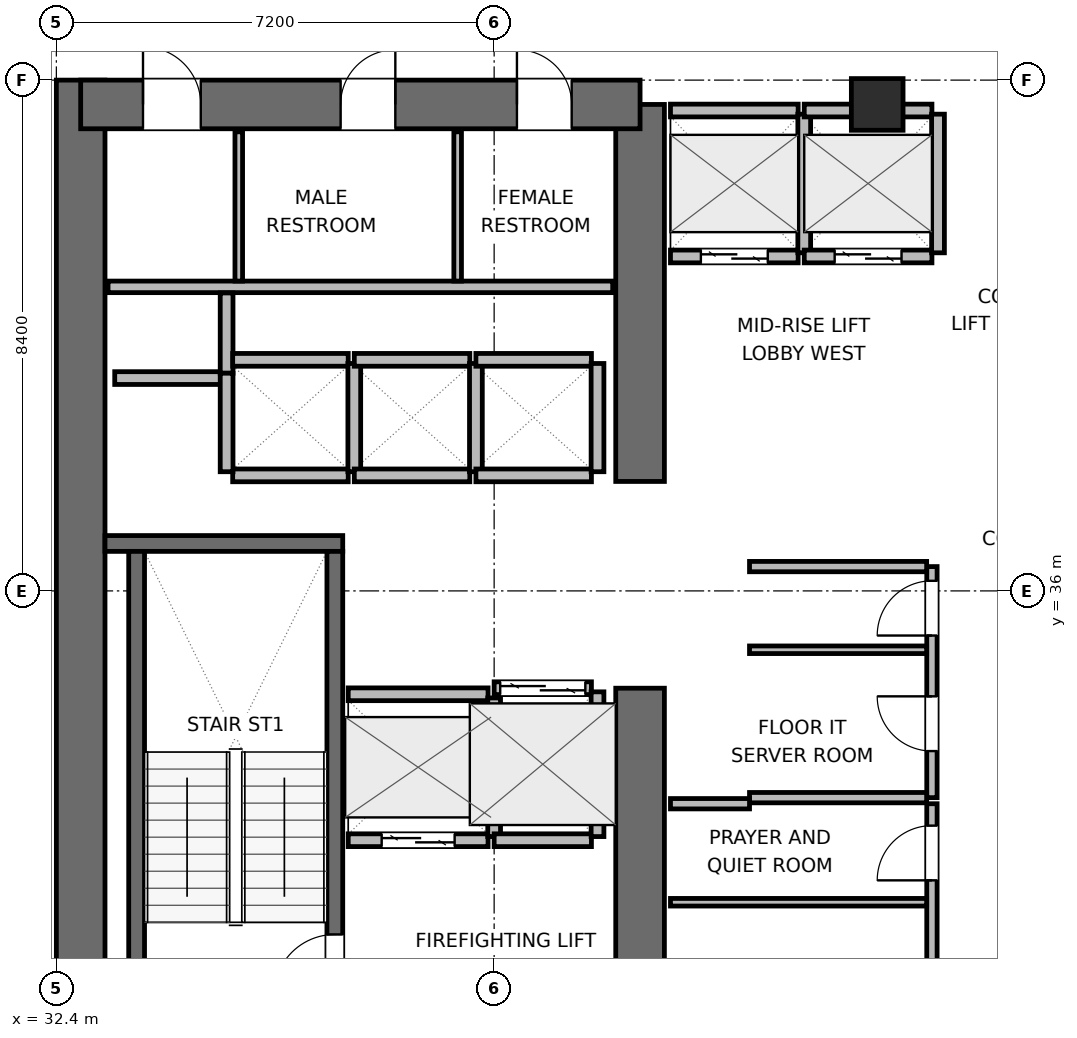
"""IFC4 building model, lengths in metres.
Left out: names, types, materials, properties, quantities, classifications, styles, units other than length and angle.
Written with IfcOpenShell. Run it as: python <this file> out.ifc"""

import sys

from ifc_helpers import new_model, si_unit, direction, frame, frame_2d, origin, origin_2d, place, context, subcontext, project, spatial, rectangle, extrude, element, fill, save


model = new_model("IFC4")
c1 = context("Model", 3, precision=1e-05, world=origin(), true_north=direction((0.0, 1.0)))
c2 = subcontext(c1, "Body", "Model", "MODEL_VIEW")
j1 = project(units=[si_unit("LENGTHUNIT", "METRE"), si_unit("PLANEANGLEUNIT", "RADIAN")], contexts=[c1])
p1 = place(None, origin())
s1 = spatial("IfcSite", under=j1, at=p1, CompositionType="ELEMENT")
p2 = place(p1, origin())
s2 = spatial("IfcBuilding", under=s1, at=p2, CompositionType="ELEMENT")
p3 = place(p2, frame((0.0, 0.0, 177.9)))
s3 = spatial("IfcBuildingStorey", under=s2, at=p3, CompositionType="ELEMENT", Elevation=177.9)
p4 = place(p3, frame((32.8, 27.6, 0.0), z_axis=(0.0, 0.0, 1.0), x_axis=(0.0, 1.0, 0.0)))
e1 = element("IfcWall", 1, at=p4, inside=s3, PredefinedType="SHEAR", context=c2, shape_type="SweptSolid", body=[
    extrude(rectangle(XDim=16.8, YDim=0.8, at=frame_2d((8.4, 0.0))), origin(), (0.0, 0.0, 1.0), 3.9),
])
p5 = place(p3, frame((42.0, 28.0, 0.0), z_axis=(0.0, 0.0, 1.0), x_axis=(0.0, 1.0, 0.0)))
e2 = element("IfcWall", 2, at=p5, inside=s3, PredefinedType="SHEAR", context=c2, shape_type="SweptSolid", body=[
    extrude(rectangle(XDim=6.4, YDim=0.8, at=frame_2d((3.2, 0.0))), origin(), (0.0, 0.0, 1.0), 3.9),
])
p6 = place(p3, frame((42.0, 37.8, 0.0), z_axis=(0.0, 0.0, 1.0), x_axis=(0.0, 1.0, 0.0)))
e3 = element("IfcWall", 3, at=p6, inside=s3, PredefinedType="SHEAR", context=c2, shape_type="SweptSolid", body=[
    extrude(rectangle(XDim=6.2, YDim=0.8, at=frame_2d((3.1, 0.0))), origin(), (0.0, 0.0, 1.0), 3.9),
])
p7 = place(p3, frame((32.8, 44.0, 0.0), z_axis=(0.0, 0.0, 1.0), x_axis=(1.0, 0.0, 0.0)))
e4 = element("IfcWall", 4, at=p7, inside=s3, PredefinedType="SHEAR", context=c2, shape_type="SweptSolid", body=[
    extrude(rectangle(XDim=9.2, YDim=0.8, at=frame_2d((4.6, 0.0))), origin(), (0.0, 0.0, 1.0), 3.9),
])
p8 = place(p7, frame((1.025, 0.0, 0.0)))
e5 = element("IfcOpeningElement", 5, at=p8, cuts=e4, PredefinedType="OPENING", context=c2, shape_type="SweptSolid", body=[
    extrude(rectangle(XDim=0.95, YDim=2.04, at=frame_2d((0.475, 1.02))), frame((0.0, 0.41, 0.0), z_axis=(0.0, -1.0, 0.0), x_axis=(1.0, 0.0, 0.0)), (0.0, 0.0, 1.0), 0.82),
])
p9 = place(p7, frame((4.275, 0.0, 0.0)))
e6 = element("IfcOpeningElement", 6, at=p9, cuts=e4, PredefinedType="OPENING", context=c2, shape_type="SweptSolid", body=[
    extrude(rectangle(XDim=0.9, YDim=2.02, at=frame_2d((0.45, 1.01))), frame((0.0, 0.41, 0.0), z_axis=(0.0, -1.0, 0.0), x_axis=(1.0, 0.0, 0.0)), (0.0, 0.0, 1.0), 0.82),
])
p10 = place(p7, frame((7.175, 0.0, 0.0)))
e7 = element("IfcOpeningElement", 7, at=p10, cuts=e4, PredefinedType="OPENING", context=c2, shape_type="SweptSolid", body=[
    extrude(rectangle(XDim=0.9, YDim=2.02, at=frame_2d((0.45, 1.01))), frame((0.0, 0.41, 0.0), z_axis=(0.0, -1.0, 0.0), x_axis=(1.0, 0.0, 0.0)), (0.0, 0.0, 1.0), 0.82),
])
p11 = place(p3, frame((33.2, 36.78, 0.0), z_axis=(0.0, 0.0, 1.0), x_axis=(1.0, 0.0, 0.0)))
e8 = element("IfcWall", 8, at=p11, inside=s3, PredefinedType="SHEAR", context=c2, shape_type="SweptSolid", body=[
    extrude(rectangle(XDim=3.91, YDim=0.26, at=frame_2d((1.955, 0.0))), origin(), (0.0, 0.0, 1.0), 3.9),
])
p12 = place(p3, frame((33.72, 29.05, 0.0), z_axis=(0.0, 0.0, 1.0), x_axis=(0.0, 1.0, 0.0)))
e9 = element("IfcWall", 9, at=p12, inside=s3, PredefinedType="SHEAR", context=c2, shape_type="SweptSolid", body=[
    extrude(rectangle(XDim=7.6, YDim=0.26, at=frame_2d((3.8, 0.0))), origin(), (0.0, 0.0, 1.0), 3.9),
])
p13 = place(p3, frame((36.98, 29.05, 0.0), z_axis=(0.0, 0.0, 1.0), x_axis=(0.0, 1.0, 0.0)))
e10 = element("IfcWall", 10, at=p13, inside=s3, PredefinedType="SHEAR", context=c2, shape_type="SweptSolid", body=[
    extrude(rectangle(XDim=7.6, YDim=0.26, at=frame_2d((3.8, 0.0))), origin(), (0.0, 0.0, 1.0), 3.9),
])
p14 = place(p13, frame((0.3, 0.0, 0.0)))
e11 = element("IfcOpeningElement", 11, at=p14, cuts=e10, PredefinedType="OPENING", context=c2, shape_type="SweptSolid", body=[
    extrude(rectangle(XDim=1.0, YDim=2.04, at=frame_2d((0.5, 1.02))), frame((0.0, 0.14, 0.0), z_axis=(0.0, -1.0, 0.0), x_axis=(1.0, 0.0, 0.0)), (0.0, 0.0, 1.0), 0.28),
])
p15 = place(p3, frame((45.9, 44.0, 0.0), z_axis=(0.0, 0.0, 1.0), x_axis=(1.0, 0.0, 0.0)))
e12 = element("IfcColumn", 12, at=p15, inside=s3, PredefinedType="COLUMN", context=c2, shape_type="SweptSolid", body=[
    extrude(rectangle(XDim=0.85, YDim=0.85, at=origin_2d()), origin(), (0.0, 0.0, 1.0), 3.9),
])
p16 = place(p3, frame((33.25, 41.0, 0.0), z_axis=(0.0, 0.0, 1.0), x_axis=(1.0, 0.0, 0.0)))
e13 = element("IfcWall", 13, at=p16, inside=s3, PredefinedType="PLUMBINGWALL", context=c2, shape_type="SweptSolid", body=[
    extrude(rectangle(XDim=8.3, YDim=0.19, at=frame_2d((4.15, 0.0))), origin(), (0.0, 0.0, 1.0), 3.68),
])
for number, where, z_axis, x_axis in (
    (14, (35.4, 41.095, 0.0), (0.0, 0.0, 1.0), (0.0, 1.0, 0.0)),
    (15, (39.0, 41.095, 0.0), (0.0, 0.0, 1.0), (0.0, 1.0, 0.0)),
):
    element("IfcWall", number, at=place(p3, frame(where, z_axis=z_axis, x_axis=x_axis)), inside=s3, PredefinedType="PARTITIONING", context=c2, shape_type="SweptSolid", body=[
        extrude(rectangle(XDim=2.455, YDim=0.125, at=frame_2d((1.228, 0.0))), origin(), (0.0, 0.0, 1.0), 3.68),
    ])
p17 = place(p3, frame((33.36, 39.5, 0.0), z_axis=(0.0, 0.0, 1.0), x_axis=(1.0, 0.0, 0.0)))
e16 = element("IfcWall", 16, at=p17, inside=s3, PredefinedType="PARTITIONING", context=c2, shape_type="SweptSolid", body=[
    extrude(rectangle(XDim=1.86, YDim=0.21, at=frame_2d((0.93, 0.0))), origin(), (0.0, 0.0, 1.0), 3.68),
])
p18 = place(p3, frame((35.2, 39.58, 0.0), z_axis=(0.0, 0.0, 1.0), x_axis=(0.0, 1.0, 0.0)))
e17 = element("IfcWall", 17, at=p18, inside=s3, PredefinedType="PARTITIONING", context=c2, shape_type="SweptSolid", body=[
    extrude(rectangle(XDim=1.32, YDim=0.21, at=frame_2d((0.66, 0.0))), origin(), (0.0, 0.0, 1.0), 3.68),
])
p19 = place(p3, frame((37.2, 31.9, 0.0), z_axis=(0.0, 0.0, 1.0), x_axis=(1.0, 0.0, 0.0)))
e18 = element("IfcWall", 18, at=p19, inside=s3, PredefinedType="PARTITIONING", context=c2, shape_type="SweptSolid", body=[
    extrude(rectangle(XDim=2.3, YDim=0.21, at=frame_2d((1.15, 0.0))), origin(), (0.0, 0.0, 1.0), 3.68),
])
p20 = place(p19, frame((0.55, 0.0, 0.0)))
e19 = element("IfcOpeningElement", 19, at=p20, cuts=e18, PredefinedType="OPENING", context=c2, shape_type="SweptSolid", body=[
    extrude(rectangle(XDim=1.2, YDim=2.04, at=frame_2d((0.6, 1.02))), frame((0.0, 0.115, 0.0), z_axis=(0.0, -1.0, 0.0), x_axis=(1.0, 0.0, 0.0)), (0.0, 0.0, 1.0), 0.23),
])
p21 = place(p3, frame((37.2, 34.3, 0.0), z_axis=(0.0, 0.0, 1.0), x_axis=(1.0, 0.0, 0.0)))
e20 = element("IfcWall", 20, at=p21, inside=s3, PredefinedType="PARTITIONING", context=c2, shape_type="SweptSolid", body=[
    extrude(rectangle(XDim=2.3, YDim=0.21, at=frame_2d((1.15, 0.0))), origin(), (0.0, 0.0, 1.0), 3.68),
])
p22 = place(p3, frame((39.6, 31.96, 0.0), z_axis=(0.0, 0.0, 1.0), x_axis=(0.0, 1.0, 0.0)))
e21 = element("IfcWall", 21, at=p22, inside=s3, PredefinedType="PARTITIONING", context=c2, shape_type="SweptSolid", body=[
    extrude(rectangle(XDim=2.28, YDim=0.21, at=frame_2d((1.14, 0.0))), origin(), (0.0, 0.0, 1.0), 3.68),
])
p23 = place(p3, frame((39.6, 34.4, 0.0), z_axis=(0.0, 0.0, 1.0), x_axis=(1.0, 0.0, 0.0)))
e22 = element("IfcWall", 22, at=p23, inside=s3, PredefinedType="PARTITIONING", context=c2, shape_type="SweptSolid", body=[
    extrude(rectangle(XDim=1.6, YDim=0.21, at=frame_2d((0.8, 0.0))), origin(), (0.0, 0.0, 1.0), 3.68),
])
p24 = place(p23, frame((0.1, 0.0, 0.0)))
e23 = element("IfcOpeningElement", 23, at=p24, cuts=e22, PredefinedType="OPENING", context=c2, shape_type="SweptSolid", body=[
    extrude(rectangle(XDim=1.4, YDim=2.06, at=frame_2d((0.7, 1.03))), frame((0.0, 0.115, 0.0), z_axis=(0.0, -1.0, 0.0), x_axis=(1.0, 0.0, 0.0)), (0.0, 0.0, 1.0), 0.23),
])
p25 = place(p3, frame((39.6, 31.9, 0.0), z_axis=(0.0, 0.0, 1.0), x_axis=(1.0, 0.0, 0.0)))
e24 = element("IfcWall", 24, at=p25, inside=s3, PredefinedType="PARTITIONING", context=c2, shape_type="SweptSolid", body=[
    extrude(rectangle(XDim=1.6, YDim=0.21, at=frame_2d((0.8, 0.0))), origin(), (0.0, 0.0, 1.0), 3.68),
])
p26 = place(p3, frame((41.3, 31.96, 0.0), z_axis=(0.0, 0.0, 1.0), x_axis=(0.0, 1.0, 0.0)))
e25 = element("IfcWall", 25, at=p26, inside=s3, PredefinedType="PARTITIONING", context=c2, shape_type="SweptSolid", body=[
    extrude(rectangle(XDim=2.38, YDim=0.21, at=frame_2d((1.19, 0.0))), origin(), (0.0, 0.0, 1.0), 3.68),
])
p27 = place(p3, frame((42.5, 41.5, 0.0), z_axis=(0.0, 0.0, 1.0), x_axis=(1.0, 0.0, 0.0)))
e26 = element("IfcWall", 26, at=p27, inside=s3, PredefinedType="PARTITIONING", context=c2, shape_type="SweptSolid", body=[
    extrude(rectangle(XDim=2.1, YDim=0.21, at=frame_2d((1.05, 0.0))), origin(), (0.0, 0.0, 1.0), 3.68),
])
p28 = place(p27, frame((0.5, 0.0, 0.0)))
e27 = element("IfcOpeningElement", 27, at=p28, cuts=e26, PredefinedType="OPENING", context=c2, shape_type="SweptSolid", body=[
    extrude(rectangle(XDim=1.1, YDim=2.04, at=frame_2d((0.55, 1.02))), frame((0.0, 0.115, 0.0), z_axis=(0.0, -1.0, 0.0), x_axis=(1.0, 0.0, 0.0)), (0.0, 0.0, 1.0), 0.23),
])
p29 = place(p3, frame((42.5, 43.9, 0.0), z_axis=(0.0, 0.0, 1.0), x_axis=(1.0, 0.0, 0.0)))
e28 = element("IfcWall", 28, at=p29, inside=s3, PredefinedType="PARTITIONING", context=c2, shape_type="SweptSolid", body=[
    extrude(rectangle(XDim=2.1, YDim=0.21, at=frame_2d((1.05, 0.0))), origin(), (0.0, 0.0, 1.0), 2.765),
])
p30 = place(p3, frame((44.7, 41.56, 0.0), z_axis=(0.0, 0.0, 1.0), x_axis=(0.0, 1.0, 0.0)))
e29 = element("IfcWall", 29, at=p30, inside=s3, PredefinedType="PARTITIONING", context=c2, shape_type="SweptSolid", body=[
    extrude(rectangle(XDim=2.28, YDim=0.21, at=frame_2d((1.14, 0.0))), origin(), (0.0, 0.0, 1.0), 3.68),
])
p31 = place(p3, frame((44.7, 41.5, 0.0), z_axis=(0.0, 0.0, 1.0), x_axis=(1.0, 0.0, 0.0)))
e30 = element("IfcWall", 30, at=p31, inside=s3, PredefinedType="PARTITIONING", context=c2, shape_type="SweptSolid", body=[
    extrude(rectangle(XDim=2.1, YDim=0.21, at=frame_2d((1.05, 0.0))), origin(), (0.0, 0.0, 1.0), 3.68),
])
p32 = place(p31, frame((0.5, 0.0, 0.0)))
e31 = element("IfcOpeningElement", 31, at=p32, cuts=e30, PredefinedType="OPENING", context=c2, shape_type="SweptSolid", body=[
    extrude(rectangle(XDim=1.1, YDim=2.04, at=frame_2d((0.55, 1.02))), frame((0.0, 0.115, 0.0), z_axis=(0.0, -1.0, 0.0), x_axis=(1.0, 0.0, 0.0)), (0.0, 0.0, 1.0), 0.23),
])
p33 = place(p3, frame((44.7, 43.9, 0.0), z_axis=(0.0, 0.0, 1.0), x_axis=(1.0, 0.0, 0.0)))
e32 = element("IfcWall", 32, at=p33, inside=s3, PredefinedType="PARTITIONING", context=c2, shape_type="SweptSolid", body=[
    extrude(rectangle(XDim=2.1, YDim=0.21, at=frame_2d((1.05, 0.0))), origin(), (0.0, 0.0, 1.0), 2.765),
])
p34 = place(p3, frame((46.9, 41.56, 0.0), z_axis=(0.0, 0.0, 1.0), x_axis=(0.0, 1.0, 0.0)))
e33 = element("IfcWall", 33, at=p34, inside=s3, PredefinedType="PARTITIONING", context=c2, shape_type="SweptSolid", body=[
    extrude(rectangle(XDim=2.28, YDim=0.21, at=frame_2d((1.14, 0.0))), origin(), (0.0, 0.0, 1.0), 3.68),
])
for number, where, z_axis, x_axis in (
    (34, (35.3, 37.9, 0.0), (0.0, 0.0, 1.0), (1.0, 0.0, 0.0)),
    (35, (35.3, 39.8, 0.0), (0.0, 0.0, 1.0), (1.0, 0.0, 0.0)),
):
    element("IfcWall", number, at=place(p3, frame(where, z_axis=z_axis, x_axis=x_axis)), inside=s3, PredefinedType="PARTITIONING", context=c2, shape_type="SweptSolid", body=[
        extrude(rectangle(XDim=1.9, YDim=0.21, at=frame_2d((0.95, 0.0))), origin(), (0.0, 0.0, 1.0), 3.68),
    ])
p35 = place(p3, frame((35.2, 37.96, 0.0), z_axis=(0.0, 0.0, 1.0), x_axis=(0.0, 1.0, 0.0)))
e36 = element("IfcWall", 36, at=p35, inside=s3, PredefinedType="PARTITIONING", context=c2, shape_type="SweptSolid", body=[
    extrude(rectangle(XDim=1.62, YDim=0.21, at=frame_2d((0.81, 0.0))), origin(), (0.0, 0.0, 1.0), 3.68),
])
p36 = place(p3, frame((37.3, 37.96, 0.0), z_axis=(0.0, 0.0, 1.0), x_axis=(0.0, 1.0, 0.0)))
e37 = element("IfcWall", 37, at=p36, inside=s3, PredefinedType="PARTITIONING", context=c2, shape_type="SweptSolid", body=[
    extrude(rectangle(XDim=1.78, YDim=0.21, at=frame_2d((0.89, 0.0))), origin(), (0.0, 0.0, 1.0), 3.68),
])
for number, where, z_axis, x_axis in (
    (38, (37.3, 37.9, 0.0), (0.0, 0.0, 1.0), (1.0, 0.0, 0.0)),
    (39, (37.3, 39.8, 0.0), (0.0, 0.0, 1.0), (1.0, 0.0, 0.0)),
):
    element("IfcWall", number, at=place(p3, frame(where, z_axis=z_axis, x_axis=x_axis)), inside=s3, PredefinedType="PARTITIONING", context=c2, shape_type="SweptSolid", body=[
        extrude(rectangle(XDim=1.9, YDim=0.21, at=frame_2d((0.95, 0.0))), origin(), (0.0, 0.0, 1.0), 3.68),
    ])
p37 = place(p3, frame((39.3, 37.96, 0.0), z_axis=(0.0, 0.0, 1.0), x_axis=(0.0, 1.0, 0.0)))
e40 = element("IfcWall", 40, at=p37, inside=s3, PredefinedType="PARTITIONING", context=c2, shape_type="SweptSolid", body=[
    extrude(rectangle(XDim=1.78, YDim=0.21, at=frame_2d((0.89, 0.0))), origin(), (0.0, 0.0, 1.0), 3.68),
])
for number, where, z_axis, x_axis in (
    (41, (39.3, 37.9, 0.0), (0.0, 0.0, 1.0), (1.0, 0.0, 0.0)),
    (42, (39.3, 39.8, 0.0), (0.0, 0.0, 1.0), (1.0, 0.0, 0.0)),
):
    element("IfcWall", number, at=place(p3, frame(where, z_axis=z_axis, x_axis=x_axis)), inside=s3, PredefinedType="PARTITIONING", context=c2, shape_type="SweptSolid", body=[
        extrude(rectangle(XDim=1.9, YDim=0.21, at=frame_2d((0.95, 0.0))), origin(), (0.0, 0.0, 1.0), 3.68),
    ])
p38 = place(p3, frame((41.3, 37.96, 0.0), z_axis=(0.0, 0.0, 1.0), x_axis=(0.0, 1.0, 0.0)))
e43 = element("IfcWall", 43, at=p38, inside=s3, PredefinedType="PARTITIONING", context=c2, shape_type="SweptSolid", body=[
    extrude(rectangle(XDim=1.78, YDim=0.21, at=frame_2d((0.89, 0.0))), origin(), (0.0, 0.0, 1.0), 3.68),
])
p39 = place(p3, frame((46.8, 32.6, 0.0), z_axis=(0.0, 0.0, 1.0), x_axis=(0.0, 1.0, 0.0)))
e44 = element("IfcWall", 44, at=p39, inside=s3, PredefinedType="PARTITIONING", context=c2, shape_type="SweptSolid", body=[
    extrude(rectangle(XDim=3.8, YDim=0.17, at=frame_2d((1.9, 0.0))), origin(), (0.0, 0.0, 1.0), 3.68),
])
p40 = place(p39, frame((0.766, 0.0, 0.0)))
e45 = element("IfcOpeningElement", 45, at=p40, cuts=e44, PredefinedType="OPENING", context=c2, shape_type="SweptSolid", body=[
    extrude(rectangle(XDim=0.9, YDim=2.02, at=frame_2d((0.45, 1.01))), frame((0.0, 0.095, 0.0), z_axis=(0.0, -1.0, 0.0), x_axis=(1.0, 0.0, 0.0)), (0.0, 0.0, 1.0), 0.19),
])
p41 = place(p39, frame((2.666, 0.0, 0.0)))
e46 = element("IfcOpeningElement", 46, at=p41, cuts=e44, PredefinedType="OPENING", context=c2, shape_type="SweptSolid", body=[
    extrude(rectangle(XDim=0.9, YDim=2.02, at=frame_2d((0.45, 1.01))), frame((0.0, 0.095, 0.0), z_axis=(0.0, -1.0, 0.0), x_axis=(1.0, 0.0, 0.0)), (0.0, 0.0, 1.0), 0.19),
])
for number, where, z_axis, x_axis in (
    (47, (43.8, 32.6, 0.0), (0.0, 0.0, 1.0), (1.0, 0.0, 0.0)),
    (48, (43.8, 36.4, 0.0), (0.0, 0.0, 1.0), (1.0, 0.0, 0.0)),
):
    element("IfcWall", number, at=place(p3, frame(where, z_axis=z_axis, x_axis=x_axis)), inside=s3, PredefinedType="PARTITIONING", context=c2, shape_type="SweptSolid", body=[
        extrude(rectangle(XDim=2.913, YDim=0.17, at=frame_2d((1.457, 0.0))), origin(), (0.0, 0.0, 1.0), 3.68),
    ])
p42 = place(p3, frame((43.8, 35.032, 0.0), z_axis=(0.0, 0.0, 1.0), x_axis=(1.0, 0.0, 0.0)))
e49 = element("IfcWall", 49, at=p42, inside=s3, PredefinedType="PARTITIONING", context=c2, shape_type="SweptSolid", body=[
    extrude(rectangle(XDim=2.913, YDim=0.125, at=frame_2d((1.457, 0.0))), origin(), (0.0, 0.0, 1.0), 3.68),
])
p43 = place(p3, frame((46.8, 28.0, 0.0), z_axis=(0.0, 0.0, 1.0), x_axis=(0.0, 1.0, 0.0)))
e50 = element("IfcWall", 50, at=p43, inside=s3, PredefinedType="PARTITIONING", context=c2, shape_type="SweptSolid", body=[
    extrude(rectangle(XDim=4.5, YDim=0.17, at=frame_2d((2.25, 0.0))), origin(), (0.0, 0.0, 1.0), 3.68),
])
p44 = place(p43, frame((0.99, 0.0, 0.0)))
e51 = element("IfcOpeningElement", 51, at=p44, cuts=e50, PredefinedType="OPENING", context=c2, shape_type="SweptSolid", body=[
    extrude(rectangle(XDim=0.9, YDim=2.02, at=frame_2d((0.45, 1.01))), frame((0.0, 0.095, 0.0), z_axis=(0.0, -1.0, 0.0), x_axis=(1.0, 0.0, 0.0)), (0.0, 0.0, 1.0), 0.19),
])
p45 = place(p43, frame((3.24, 0.0, 0.0)))
e52 = element("IfcOpeningElement", 52, at=p45, cuts=e50, PredefinedType="OPENING", context=c2, shape_type="SweptSolid", body=[
    extrude(rectangle(XDim=0.9, YDim=2.02, at=frame_2d((0.45, 1.01))), frame((0.0, 0.095, 0.0), z_axis=(0.0, -1.0, 0.0), x_axis=(1.0, 0.0, 0.0)), (0.0, 0.0, 1.0), 0.19),
])
p46 = place(p3, frame((42.5, 32.5, 0.0), z_axis=(0.0, 0.0, 1.0), x_axis=(1.0, 0.0, 0.0)))
e53 = element("IfcWall", 53, at=p46, inside=s3, PredefinedType="PARTITIONING", context=c2, shape_type="SweptSolid", body=[
    extrude(rectangle(XDim=1.3, YDim=0.17, at=frame_2d((0.65, 0.0))), origin(), (0.0, 0.0, 1.0), 3.68),
])
p47 = place(p3, frame((42.5, 30.88, 0.0), z_axis=(0.0, 0.0, 1.0), x_axis=(1.0, 0.0, 0.0)))
e54 = element("IfcWall", 54, at=p47, inside=s3, PredefinedType="PARTITIONING", context=c2, shape_type="SweptSolid", body=[
    extrude(rectangle(XDim=4.213, YDim=0.125, at=frame_2d((2.106, 0.0))), origin(), (0.0, 0.0, 1.0), 3.68),
])
p48 = place(p14, origin())
e55 = element("IfcDoor", 55, at=p48, inside=s3, OperationType="SINGLE_SWING_LEFT", PredefinedType="DOOR", context=c2, shape_type="SweptSolid", body=[
    extrude(rectangle(XDim=1.0, YDim=2.04, at=frame_2d((0.5, 1.02))), frame((0.0, 0.025, 0.0), z_axis=(0.0, -1.0, 0.0), x_axis=(1.0, 0.0, 0.0)), (0.0, 0.0, 1.0), 0.05),
])
fill(e11, e55)
p49 = place(p20, origin())
e56 = element("IfcDoor", 56, at=p49, inside=s3, OperationType="DOUBLE_DOOR_SLIDING", PredefinedType="DOOR", context=c2, shape_type="SweptSolid", body=[
    extrude(rectangle(XDim=1.2, YDim=2.04, at=frame_2d((0.6, 1.02))), frame((0.0, 0.025, 0.0), z_axis=(0.0, -1.0, 0.0), x_axis=(1.0, 0.0, 0.0)), (0.0, 0.0, 1.0), 0.05),
])
fill(e19, e56)
p50 = place(p24, origin())
e57 = element("IfcDoor", 57, at=p50, inside=s3, OperationType="DOUBLE_DOOR_SLIDING", PredefinedType="DOOR", context=c2, shape_type="SweptSolid", body=[
    extrude(rectangle(XDim=1.4, YDim=2.06, at=frame_2d((0.7, 1.03))), frame((0.0, 0.025, 0.0), z_axis=(0.0, -1.0, 0.0), x_axis=(1.0, 0.0, 0.0)), (0.0, 0.0, 1.0), 0.05),
])
fill(e23, e57)
p51 = place(p28, origin())
e58 = element("IfcDoor", 58, at=p51, inside=s3, OperationType="DOUBLE_DOOR_SLIDING", PredefinedType="DOOR", context=c2, shape_type="SweptSolid", body=[
    extrude(rectangle(XDim=1.1, YDim=2.04, at=frame_2d((0.55, 1.02))), frame((0.0, 0.025, 0.0), z_axis=(0.0, -1.0, 0.0), x_axis=(1.0, 0.0, 0.0)), (0.0, 0.0, 1.0), 0.05),
])
fill(e27, e58)
p52 = place(p32, origin())
e59 = element("IfcDoor", 59, at=p52, inside=s3, OperationType="DOUBLE_DOOR_SLIDING", PredefinedType="DOOR", context=c2, shape_type="SweptSolid", body=[
    extrude(rectangle(XDim=1.1, YDim=2.04, at=frame_2d((0.55, 1.02))), frame((0.0, 0.025, 0.0), z_axis=(0.0, -1.0, 0.0), x_axis=(1.0, 0.0, 0.0)), (0.0, 0.0, 1.0), 0.05),
])
fill(e31, e59)
p53 = place(p8, origin())
e60 = element("IfcDoor", 60, at=p53, inside=s3, OperationType="SINGLE_SWING_LEFT", PredefinedType="DOOR", context=c2, shape_type="SweptSolid", body=[
    extrude(rectangle(XDim=0.95, YDim=2.04, at=frame_2d((0.475, 1.02))), frame((0.0, 0.025, 0.0), z_axis=(0.0, -1.0, 0.0), x_axis=(1.0, 0.0, 0.0)), (0.0, 0.0, 1.0), 0.05),
])
fill(e5, e60)
p54 = place(p9, origin())
e61 = element("IfcDoor", 61, at=p54, inside=s3, OperationType="SINGLE_SWING_RIGHT", PredefinedType="DOOR", context=c2, shape_type="SweptSolid", body=[
    extrude(rectangle(XDim=0.9, YDim=2.02, at=frame_2d((0.45, 1.01))), frame((0.0, 0.025, 0.0), z_axis=(0.0, -1.0, 0.0), x_axis=(1.0, 0.0, 0.0)), (0.0, 0.0, 1.0), 0.05),
])
fill(e6, e61)
p55 = place(p10, origin())
e62 = element("IfcDoor", 62, at=p55, inside=s3, OperationType="SINGLE_SWING_LEFT", PredefinedType="DOOR", context=c2, shape_type="SweptSolid", body=[
    extrude(rectangle(XDim=0.9, YDim=2.02, at=frame_2d((0.45, 1.01))), frame((0.0, 0.025, 0.0), z_axis=(0.0, -1.0, 0.0), x_axis=(1.0, 0.0, 0.0)), (0.0, 0.0, 1.0), 0.05),
])
fill(e7, e62)
p56 = place(p40, origin())
e63 = element("IfcDoor", 63, at=p56, inside=s3, OperationType="SINGLE_SWING_RIGHT", PredefinedType="DOOR", context=c2, shape_type="SweptSolid", body=[
    extrude(rectangle(XDim=0.9, YDim=2.02, at=frame_2d((0.45, 1.01))), frame((0.0, 0.025, 0.0), z_axis=(0.0, -1.0, 0.0), x_axis=(1.0, 0.0, 0.0)), (0.0, 0.0, 1.0), 0.05),
])
fill(e45, e63)
p57 = place(p41, origin())
e64 = element("IfcDoor", 64, at=p57, inside=s3, OperationType="SINGLE_SWING_LEFT", PredefinedType="DOOR", context=c2, shape_type="SweptSolid", body=[
    extrude(rectangle(XDim=0.9, YDim=2.02, at=frame_2d((0.45, 1.01))), frame((0.0, 0.025, 0.0), z_axis=(0.0, -1.0, 0.0), x_axis=(1.0, 0.0, 0.0)), (0.0, 0.0, 1.0), 0.05),
])
fill(e46, e64)
p58 = place(p45, origin())
e65 = element("IfcDoor", 65, at=p58, inside=s3, OperationType="SINGLE_SWING_LEFT", PredefinedType="DOOR", context=c2, shape_type="SweptSolid", body=[
    extrude(rectangle(XDim=0.9, YDim=2.02, at=frame_2d((0.45, 1.01))), frame((0.0, 0.025, 0.0), z_axis=(0.0, -1.0, 0.0), x_axis=(1.0, 0.0, 0.0)), (0.0, 0.0, 1.0), 0.05),
])
fill(e52, e65)
save(model, sys.argv[1])
